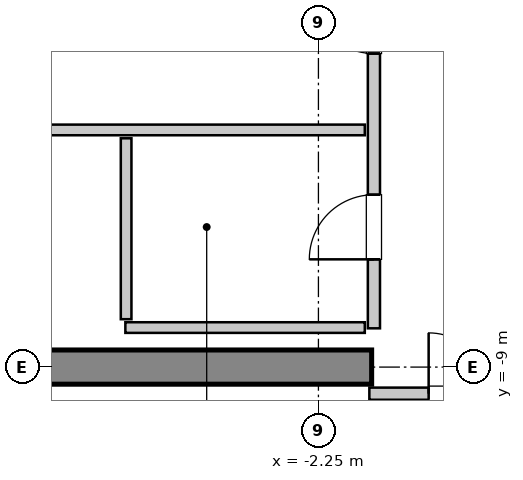
"""IFC4 building model, lengths in metres.
Left out: names, types, materials, properties, quantities, classifications, styles, units other than length and angle.
Written with IfcOpenShell. Run it as: python <this file> out.ifc"""

import sys

from ifc_helpers import new_model, si_unit, direction, frame, frame_2d, origin, place, context, subcontext, project, spatial, rectangle, extrude, source, transform, mapped, element, fill, save


model = new_model("IFC4")
c1 = context("Model", 3, precision=1e-05, world=origin(), true_north=direction((0.0, 1.0)))
c2 = subcontext(c1, "Body", "Model", "MODEL_VIEW")
j1 = project(units=[si_unit("LENGTHUNIT", "METRE"), si_unit("PLANEANGLEUNIT", "RADIAN")], contexts=[c1])
p1 = place(None, origin())
s1 = spatial("IfcSite", under=j1, at=p1, CompositionType="ELEMENT")
p2 = place(p1, origin())
s2 = spatial("IfcBuilding", under=s1, at=p2, CompositionType="ELEMENT")
p3 = place(p2, frame((0.0, 0.0, 287.4)))
s3 = spatial("IfcBuildingStorey", under=s2, at=p3, CompositionType="ELEMENT", Elevation=287.4)
m1 = source(origin(), c2, "Body", "SweptSolid", [
    extrude(rectangle(XDim=9.925, YDim=0.45, at=frame_2d((4.962, 0.0))), origin(), (0.0, 0.0, 1.0), 3.8),
])
p4 = place(p3, frame((-11.475, -9.0, 0.0), z_axis=(0.0, 0.0, 1.0), x_axis=(1.0, 0.0, 0.0)))
e1 = element("IfcWall", 1, at=p4, inside=s3, PredefinedType="SHEAR", context=c2, shape_type="MappedRepresentation", body=[
    mapped(m1, transform((0.0, 0.0, 0.0), x_axis=(1.0, 0.0, 0.0), y_axis=(0.0, 1.0, 0.0), z_axis=(0.0, 0.0, 1.0), scale=1.0)),
])
m2 = source(origin(), c2, "Body", "SweptSolid", [
    extrude(rectangle(XDim=3.16, YDim=0.16, at=frame_2d((1.58, 0.0))), origin(), (0.0, 0.0, 1.0), 2.625),
])
p5 = place(p3, frame((-1.58, -9.35, 0.0), z_axis=(0.0, 0.0, 1.0), x_axis=(1.0, 0.0, 0.0)))
e2 = element("IfcWall", 2, at=p5, inside=s3, PredefinedType="PARTITIONING", context=c2, shape_type="MappedRepresentation", body=[
    mapped(m2, transform((0.0, 0.0, 0.0), x_axis=(1.0, 0.0, 0.0), y_axis=(0.0, 1.0, 0.0), z_axis=(0.0, 0.0, 1.0), scale=1.0)),
])
p6 = place(p5, frame((0.78, 0.0, 0.0)))
e3 = element("IfcOpeningElement", 3, at=p6, cuts=e2, PredefinedType="OPENING", context=c2, shape_type="SweptSolid", body=[
    extrude(rectangle(XDim=1.6, YDim=2.3, at=frame_2d((0.8, 1.15))), frame((0.0, 0.09, 0.0), z_axis=(0.0, -1.0, 0.0), x_axis=(1.0, 0.0, 0.0)), (0.0, 0.0, 1.0), 0.18),
])
m3 = source(origin(), c2, "Body", "SweptSolid", [
    extrude(rectangle(XDim=5.48, YDim=0.16, at=frame_2d((2.74, 0.0))), origin(), (0.0, 0.0, 1.0), 3.535),
])
p7 = place(p3, frame((-1.52, -8.49, 0.0), z_axis=(0.0, 0.0, 1.0), x_axis=(0.0, 1.0, 0.0)))
e4 = element("IfcWall", 4, at=p7, inside=s3, PredefinedType="PARTITIONING", context=c2, shape_type="MappedRepresentation", body=[
    mapped(m3, transform((0.0, 0.0, 0.0), x_axis=(1.0, 0.0, 0.0), y_axis=(0.0, 1.0, 0.0), z_axis=(0.0, 0.0, 1.0), scale=1.0)),
])
p8 = place(p7, frame((0.907, 0.0, 0.0)))
e5 = element("IfcOpeningElement", 5, at=p8, cuts=e4, PredefinedType="OPENING", context=c2, shape_type="SweptSolid", body=[
    extrude(rectangle(XDim=0.85, YDim=2.1, at=frame_2d((0.425, 1.05))), frame((0.0, 0.09, 0.0), z_axis=(0.0, -1.0, 0.0), x_axis=(1.0, 0.0, 0.0)), (0.0, 0.0, 1.0), 0.18),
])
p9 = place(p7, frame((3.615, 0.0, 0.0)))
e6 = element("IfcOpeningElement", 6, at=p9, cuts=e4, PredefinedType="OPENING", context=c2, shape_type="SweptSolid", body=[
    extrude(rectangle(XDim=0.85, YDim=2.1, at=frame_2d((0.425, 1.05))), frame((0.0, 0.09, 0.0), z_axis=(0.0, -1.0, 0.0), x_axis=(1.0, 0.0, 0.0)), (0.0, 0.0, 1.0), 0.18),
])
m4 = source(origin(), c2, "Body", "SweptSolid", [
    extrude(rectangle(XDim=5.55, YDim=0.14, at=frame_2d((2.775, 0.0))), origin(), (0.0, 0.0, 1.0), 3.535),
])
p10 = place(p3, frame((-7.19, -5.88, 0.0), z_axis=(0.0, 0.0, 1.0), x_axis=(1.0, 0.0, 0.0)))
e7 = element("IfcWall", 7, at=p10, inside=s3, PredefinedType="PARTITIONING", context=c2, shape_type="MappedRepresentation", body=[
    mapped(m4, transform((0.0, 0.0, 0.0), x_axis=(1.0, 0.0, 0.0), y_axis=(0.0, 1.0, 0.0), z_axis=(0.0, 0.0, 1.0), scale=1.0)),
])
m5 = source(origin(), c2, "Body", "SweptSolid", [
    extrude(rectangle(XDim=3.15, YDim=0.14, at=frame_2d((1.575, 0.0))), origin(), (0.0, 0.0, 1.0), 3.535),
])
p11 = place(p3, frame((-4.79, -8.48, 0.0), z_axis=(0.0, 0.0, 1.0), x_axis=(1.0, 0.0, 0.0)))
e8 = element("IfcWall", 8, at=p11, inside=s3, PredefinedType="PARTITIONING", context=c2, shape_type="MappedRepresentation", body=[
    mapped(m5, transform((0.0, 0.0, 0.0), x_axis=(1.0, 0.0, 0.0), y_axis=(0.0, 1.0, 0.0), z_axis=(0.0, 0.0, 1.0), scale=1.0)),
])
m6 = source(origin(), c2, "Body", "SweptSolid", [
    extrude(rectangle(XDim=2.38, YDim=0.14, at=frame_2d((1.19, 0.0))), origin(), (0.0, 0.0, 1.0), 3.535),
])
p12 = place(p3, frame((-4.78, -8.37, 0.0), z_axis=(0.0, 0.0, 1.0), x_axis=(0.0, 1.0, 0.0)))
e9 = element("IfcWall", 9, at=p12, inside=s3, PredefinedType="PARTITIONING", context=c2, shape_type="MappedRepresentation", body=[
    mapped(m6, transform((0.0, 0.0, 0.0), x_axis=(1.0, 0.0, 0.0), y_axis=(0.0, 1.0, 0.0), z_axis=(0.0, 0.0, 1.0), scale=1.0)),
])
m7 = source(origin(), c2, "Body", "SweptSolid", [
    extrude(rectangle(XDim=1.6, YDim=2.3, at=frame_2d((0.8, 1.15))), frame((0.0, 0.025, 0.0), z_axis=(0.0, -1.0, 0.0), x_axis=(1.0, 0.0, 0.0)), (0.0, 0.0, 1.0), 0.05),
])
p13 = place(p6, origin())
e10 = element("IfcDoor", 10, at=p13, inside=s3, OperationType="DOUBLE_DOOR_SINGLE_SWING", PredefinedType="DOOR", context=c2, shape_type="MappedRepresentation", body=[
    mapped(m7, transform((0.0, 0.0, 0.0), x_axis=(1.0, 0.0, 0.0), y_axis=(0.0, 1.0, 0.0), z_axis=(0.0, 0.0, 1.0), scale=1.0)),
])
fill(e3, e10)
m8 = source(origin(), c2, "Body", "SweptSolid", [
    extrude(rectangle(XDim=0.85, YDim=2.1, at=frame_2d((0.425, 1.05))), frame((0.0, 0.025, 0.0), z_axis=(0.0, -1.0, 0.0), x_axis=(1.0, 0.0, 0.0)), (0.0, 0.0, 1.0), 0.05),
])
p14 = place(p8, origin())
e11 = element("IfcDoor", 11, at=p14, inside=s3, OperationType="SINGLE_SWING_LEFT", PredefinedType="DOOR", context=c2, shape_type="MappedRepresentation", body=[
    mapped(m8, transform((0.0, 0.0, 0.0), x_axis=(1.0, 0.0, 0.0), y_axis=(0.0, 1.0, 0.0), z_axis=(0.0, 0.0, 1.0), scale=1.0)),
])
fill(e5, e11)
p15 = place(p9, origin())
e12 = element("IfcDoor", 12, at=p15, inside=s3, OperationType="SINGLE_SWING_RIGHT", PredefinedType="DOOR", context=c2, shape_type="MappedRepresentation", body=[
    mapped(m8, transform((0.0, 0.0, 0.0), x_axis=(1.0, 0.0, 0.0), y_axis=(0.0, 1.0, 0.0), z_axis=(0.0, 0.0, 1.0), scale=1.0)),
])
fill(e6, e12)
save(model, sys.argv[1])
